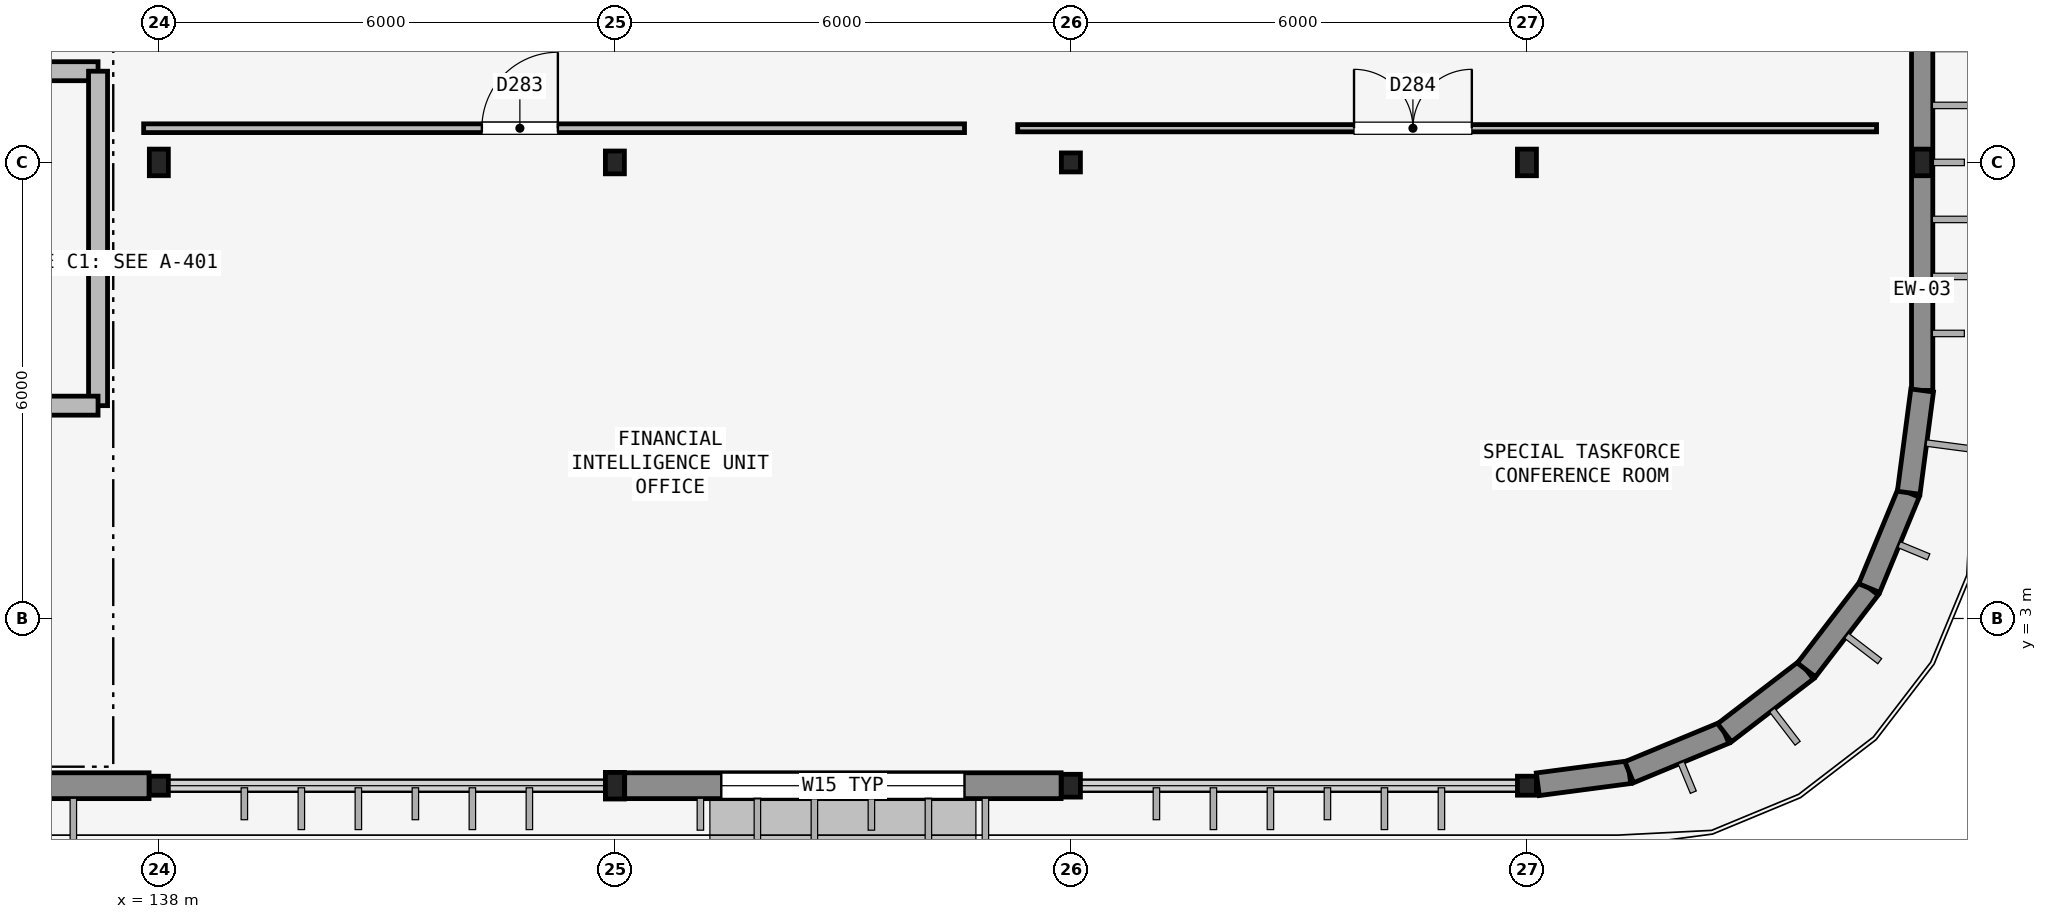
"""IFC4 building model, lengths in metres.
Left out: names, types, materials, properties, quantities, classifications, styles, units other than length and angle.
Written with IfcOpenShell. Run it as: python <this file> out.ifc"""

import sys

from ifc_helpers import new_model, si_unit, direction, frame, frame_2d, origin, origin_2d, place, context, subcontext, project, spatial, rectangle, hollow_rectangle, i_section, extrude, element, fill, save


model = new_model("IFC4")
c1 = context("Model", 3, precision=1e-05, world=origin(), true_north=direction((0.0, 1.0)))
c2 = subcontext(c1, "Body", "Model", "MODEL_VIEW")
j1 = project(units=[si_unit("LENGTHUNIT", "METRE"), si_unit("PLANEANGLEUNIT", "RADIAN")], contexts=[c1])
p1 = place(None, origin())
s1 = spatial("IfcSite", under=j1, at=p1, CompositionType="ELEMENT")
p2 = place(p1, origin())
s2 = spatial("IfcBuilding", under=s1, at=p2, CompositionType="ELEMENT")
p3 = place(p2, frame((0.0, 0.0, 22.2)))
s3 = spatial("IfcBuildingStorey", under=s2, at=p3, CompositionType="ELEMENT", Elevation=22.2)
p4 = place(p3, frame((138.0, 0.8, 0.0), z_axis=(0.0, 0.0, 1.0), x_axis=(1.0, 0.0, 0.0)))
e1 = element("IfcColumn", 1, at=p4, inside=s3, PredefinedType="COLUMN", context=c2, shape_type="SweptSolid", body=[
    extrude(hollow_rectangle(XDim=0.25, YDim=0.25, WallThickness=0.012, InnerFilletRadius=0.012, OuterFilletRadius=0.024, at=origin_2d()), origin(), (0.0, 0.0, 1.0), 3.9),
])
for number, where, z_axis, x_axis in (
    (2, (138.0, 9.0, 0.0), (0.0, 0.0, 1.0), (1.0, 0.0, 0.0)),
    (3, (144.0, 0.8, 0.0), (0.0, 0.0, 1.0), (1.0, 0.0, 0.0)),
):
    element("IfcColumn", number, at=place(p3, frame(where, z_axis=z_axis, x_axis=x_axis)), inside=s3, PredefinedType="COLUMN", context=c2, shape_type="SweptSolid", body=[
        extrude(i_section(OverallWidth=0.25, OverallDepth=0.35, WebThickness=0.01, FlangeThickness=0.012, FilletRadius=0.012, at=origin_2d()), origin(), (0.0, 0.0, 1.0), 3.9),
    ])
for number, where, z_axis, x_axis in (
    (4, (144.0, 9.0, 0.0), (0.0, 0.0, 1.0), (1.0, 0.0, 0.0)),
    (5, (150.0, 0.8, 0.0), (0.0, 0.0, 1.0), (1.0, 0.0, 0.0)),
):
    element("IfcColumn", number, at=place(p3, frame(where, z_axis=z_axis, x_axis=x_axis)), inside=s3, PredefinedType="COLUMN", context=c2, shape_type="SweptSolid", body=[
        extrude(i_section(OverallWidth=0.25, OverallDepth=0.3, WebThickness=0.01, FlangeThickness=0.01, FilletRadius=0.012, at=origin_2d()), origin(), (0.0, 0.0, 1.0), 3.9),
    ])
for number, where, z_axis, x_axis in (
    (6, (150.0, 9.0, 0.0), (0.0, 0.0, 1.0), (1.0, 0.0, 0.0)),
    (7, (156.0, 0.8, 0.0), (0.0, 0.0, 1.0), (1.0, 0.0, 0.0)),
):
    element("IfcColumn", number, at=place(p3, frame(where, z_axis=z_axis, x_axis=x_axis)), inside=s3, PredefinedType="COLUMN", context=c2, shape_type="SweptSolid", body=[
        extrude(hollow_rectangle(XDim=0.25, YDim=0.25, WallThickness=0.012, InnerFilletRadius=0.012, OuterFilletRadius=0.024, at=origin_2d()), origin(), (0.0, 0.0, 1.0), 3.9),
    ])
for number, where, z_axis, x_axis in (
    (8, (156.0, 9.0, 0.0), (0.0, 0.0, 1.0), (1.0, 0.0, 0.0)),
    (9, (161.2, 9.0, 0.0), (0.0, 0.0, 1.0), (1.0, 0.0, 0.0)),
):
    element("IfcColumn", number, at=place(p3, frame(where, z_axis=z_axis, x_axis=x_axis)), inside=s3, PredefinedType="COLUMN", context=c2, shape_type="SweptSolid", body=[
        extrude(i_section(OverallWidth=0.25, OverallDepth=0.35, WebThickness=0.01, FlangeThickness=0.012, FilletRadius=0.012, at=origin_2d()), origin(), (0.0, 0.0, 1.0), 3.9),
    ])
p5 = place(p3, frame((132.129, 0.8, 0.0), z_axis=(0.0, 0.0, 1.0), x_axis=(1.0, 0.0, 0.0)))
e10 = element("IfcWall", 10, at=p5, inside=s3, PredefinedType="SOLIDWALL", context=c2, shape_type="SweptSolid", body=[
    extrude(rectangle(XDim=5.742, YDim=0.34, at=frame_2d((2.871, 0.0))), origin(), (0.0, 0.0, 1.0), 3.23),
])
p6 = place(p5, frame((1.971, 0.0, 0.6)))
e11 = element("IfcOpeningElement", 11, at=p6, cuts=e10, PredefinedType="OPENING", context=c2, shape_type="SweptSolid", body=[
    extrude(rectangle(XDim=1.8, YDim=2.2, at=frame_2d((0.9, 1.1))), frame((0.0, 0.18, 0.0), z_axis=(0.0, -1.0, 0.0), x_axis=(1.0, 0.0, 0.0)), (0.0, 0.0, 1.0), 0.36),
])
p7 = place(p3, frame((144.129, 0.8, 0.0), z_axis=(0.0, 0.0, 1.0), x_axis=(1.0, 0.0, 0.0)))
e12 = element("IfcWall", 12, at=p7, inside=s3, PredefinedType="SOLIDWALL", context=c2, shape_type="SweptSolid", body=[
    extrude(rectangle(XDim=5.742, YDim=0.34, at=frame_2d((2.871, 0.0))), origin(), (0.0, 0.0, 1.0), 3.23),
])
p8 = place(p7, frame((1.271, 0.0, 0.8)))
e13 = element("IfcOpeningElement", 13, at=p8, cuts=e12, PredefinedType="OPENING", context=c2, shape_type="SweptSolid", body=[
    extrude(rectangle(XDim=3.2, YDim=1.8, at=frame_2d((1.6, 0.9))), frame((0.0, 0.18, 0.0), z_axis=(0.0, -1.0, 0.0), x_axis=(1.0, 0.0, 0.0)), (0.0, 0.0, 1.0), 0.36),
])
p9 = place(p3, frame((161.2, 6.0, 0.0), z_axis=(0.0, 0.0, 1.0), x_axis=(0.0, 1.0, 0.0)))
e14 = element("IfcWall", 14, at=p9, inside=s3, PredefinedType="SOLIDWALL", context=c2, shape_type="SweptSolid", body=[
    extrude(rectangle(XDim=6.0, YDim=0.28, at=frame_2d((3.0, 0.0))), origin(), (0.0, 0.0, 1.0), 3.08),
])
p10 = place(p3, frame((156.143, 0.819, 0.0), z_axis=(0.0, 0.0, 1.0), x_axis=(0.99143579315, 0.130595053735, 0.0)))
e15 = element("IfcWall", 15, at=p10, inside=s3, PredefinedType="SOLIDWALL", context=c2, shape_type="SweptSolid", body=[
    extrude(rectangle(XDim=1.213, YDim=0.3, at=frame_2d((0.607, 0.0))), origin(), (0.0, 0.0, 1.0), 3.23),
])
for number, where, z_axis, x_axis in (
    (16, (157.346, 0.977, 0.0), (0.0, 0.0, 1.0), (0.924, 0.383, 0.0)),
    (17, (158.6, 1.497, 0.0), (0.0, 0.0, 1.0), (0.793, 0.609, 0.0)),
    (18, (159.677, 2.323, 0.0), (0.0, 0.0, 1.0), (0.609, 0.793, 0.0)),
    (19, (160.503, 3.4, 0.0), (0.0, 0.0, 1.0), (0.383, 0.924, 0.0)),
):
    element("IfcWall", number, at=place(p3, frame(where, z_axis=z_axis, x_axis=x_axis)), inside=s3, PredefinedType="SOLIDWALL", context=c2, shape_type="SweptSolid", body=[
        extrude(rectangle(XDim=1.357, YDim=0.3, at=frame_2d((0.679, 0.0))), origin(), (0.0, 0.0, 1.0), 3.685),
    ])
p11 = place(p3, frame((161.023, 4.654, 0.0), z_axis=(0.0, 0.0, 1.0), x_axis=(0.130561507967, 0.991440211328, 0.0)))
e20 = element("IfcWall", 20, at=p11, inside=s3, PredefinedType="SOLIDWALL", context=c2, shape_type="SweptSolid", body=[
    extrude(rectangle(XDim=1.358, YDim=0.3, at=frame_2d((0.679, 0.0))), origin(), (0.0, 0.0, 1.0), 3.685),
])
p12 = place(p3, frame((131.55, 10.2, 0.0), z_axis=(0.0, 0.0, 1.0), x_axis=(1.0, 0.0, 0.0)))
e21 = element("IfcWall", 21, at=p12, inside=s3, PredefinedType="PARTITIONING", context=c2, shape_type="SweptSolid", body=[
    extrude(rectangle(XDim=5.65, YDim=0.25, at=frame_2d((2.825, 0.0))), origin(), (0.0, 0.0, 1.0), 3.28),
])
p13 = place(p12, frame((2.075, 0.0, 0.0)))
e22 = element("IfcOpeningElement", 22, at=p13, cuts=e21, PredefinedType="OPENING", context=c2, shape_type="SweptSolid", body=[
    extrude(rectangle(XDim=1.5, YDim=2.15, at=frame_2d((0.75, 1.075))), frame((0.0, 0.135, 0.0), z_axis=(0.0, -1.0, 0.0), x_axis=(1.0, 0.0, 0.0)), (0.0, 0.0, 1.0), 0.27),
])
p14 = place(p3, frame((137.2, 5.8, 0.0), z_axis=(0.0, 0.0, 1.0), x_axis=(0.0, 1.0, 0.0)))
e23 = element("IfcWall", 23, at=p14, inside=s3, PredefinedType="PARTITIONING", context=c2, shape_type="SweptSolid", body=[
    extrude(rectangle(XDim=4.4, YDim=0.25, at=frame_2d((2.2, 0.0))), origin(), (0.0, 0.0, 1.0), 3.23),
])
p15 = place(p3, frame((135.6, 5.8, 0.0), z_axis=(0.0, 0.0, 1.0), x_axis=(1.0, 0.0, 0.0)))
e24 = element("IfcWall", 24, at=p15, inside=s3, PredefinedType="PARTITIONING", context=c2, shape_type="SweptSolid", body=[
    extrude(rectangle(XDim=1.6, YDim=0.25, at=frame_2d((0.8, 0.0))), origin(), (0.0, 0.0, 1.0), 3.68),
])
p16 = place(p3, frame((137.8, 9.45, 0.0), z_axis=(0.0, 0.0, 1.0), x_axis=(1.0, 0.0, 0.0)))
e25 = element("IfcWall", 25, at=p16, inside=s3, PredefinedType="PARTITIONING", context=c2, shape_type="SweptSolid", body=[
    extrude(rectangle(XDim=10.8, YDim=0.115, at=frame_2d((5.4, 0.0))), origin(), (0.0, 0.0, 1.0), 3.28),
])
p17 = place(p16, frame((4.45, 0.0, 0.0)))
e26 = element("IfcOpeningElement", 26, at=p17, cuts=e25, PredefinedType="OPENING", context=c2, shape_type="SweptSolid", body=[
    extrude(rectangle(XDim=1.0, YDim=2.15, at=frame_2d((0.5, 1.075))), frame((0.0, 0.067, 0.0), z_axis=(0.0, -1.0, 0.0), x_axis=(1.0, 0.0, 0.0)), (0.0, 0.0, 1.0), 0.135),
])
p18 = place(p3, frame((149.3, 9.45, 0.0), z_axis=(0.0, 0.0, 1.0), x_axis=(1.0, 0.0, 0.0)))
e27 = element("IfcWall", 27, at=p18, inside=s3, PredefinedType="PARTITIONING", context=c2, shape_type="SweptSolid", body=[
    extrude(rectangle(XDim=11.3, YDim=0.095, at=frame_2d((5.65, 0.0))), origin(), (0.0, 0.0, 1.0), 3.28),
])
p19 = place(p18, frame((4.425, 0.0, 0.0)))
e28 = element("IfcOpeningElement", 28, at=p19, cuts=e27, PredefinedType="OPENING", context=c2, shape_type="SweptSolid", body=[
    extrude(rectangle(XDim=1.55, YDim=2.2, at=frame_2d((0.775, 1.1))), frame((0.0, 0.057, 0.0), z_axis=(0.0, -1.0, 0.0), x_axis=(1.0, 0.0, 0.0)), (0.0, 0.0, 1.0), 0.115),
])
p20 = place(p8, origin())
e29 = element("IfcWindow", 29, at=p20, inside=s3, PartitioningType="SINGLE_PANEL", PredefinedType="WINDOW", context=c2, shape_type="SweptSolid", body=[
    extrude(rectangle(XDim=3.2, YDim=1.8, at=frame_2d((1.6, 0.9))), frame((0.0, 0.03, 0.0), z_axis=(0.0, -1.0, 0.0), x_axis=(1.0, 0.0, 0.0)), (0.0, 0.0, 1.0), 0.06),
])
fill(e13, e29)
p21 = place(p17, origin())
e30 = element("IfcDoor", 30, at=p21, inside=s3, OperationType="SINGLE_SWING_RIGHT", PredefinedType="DOOR", context=c2, shape_type="SweptSolid", body=[
    extrude(rectangle(XDim=1.0, YDim=2.15, at=frame_2d((0.5, 1.075))), frame((0.0, 0.025, 0.0), z_axis=(0.0, -1.0, 0.0), x_axis=(1.0, 0.0, 0.0)), (0.0, 0.0, 1.0), 0.05),
])
fill(e26, e30)
p22 = place(p19, origin())
e31 = element("IfcDoor", 31, at=p22, inside=s3, OperationType="DOUBLE_DOOR_SINGLE_SWING", PredefinedType="DOOR", context=c2, shape_type="SweptSolid", body=[
    extrude(rectangle(XDim=1.55, YDim=2.2, at=frame_2d((0.775, 1.1))), frame((0.0, 0.025, 0.0), z_axis=(0.0, -1.0, 0.0), x_axis=(1.0, 0.0, 0.0)), (0.0, 0.0, 1.0), 0.05),
])
fill(e28, e31)
save(model, sys.argv[1])
